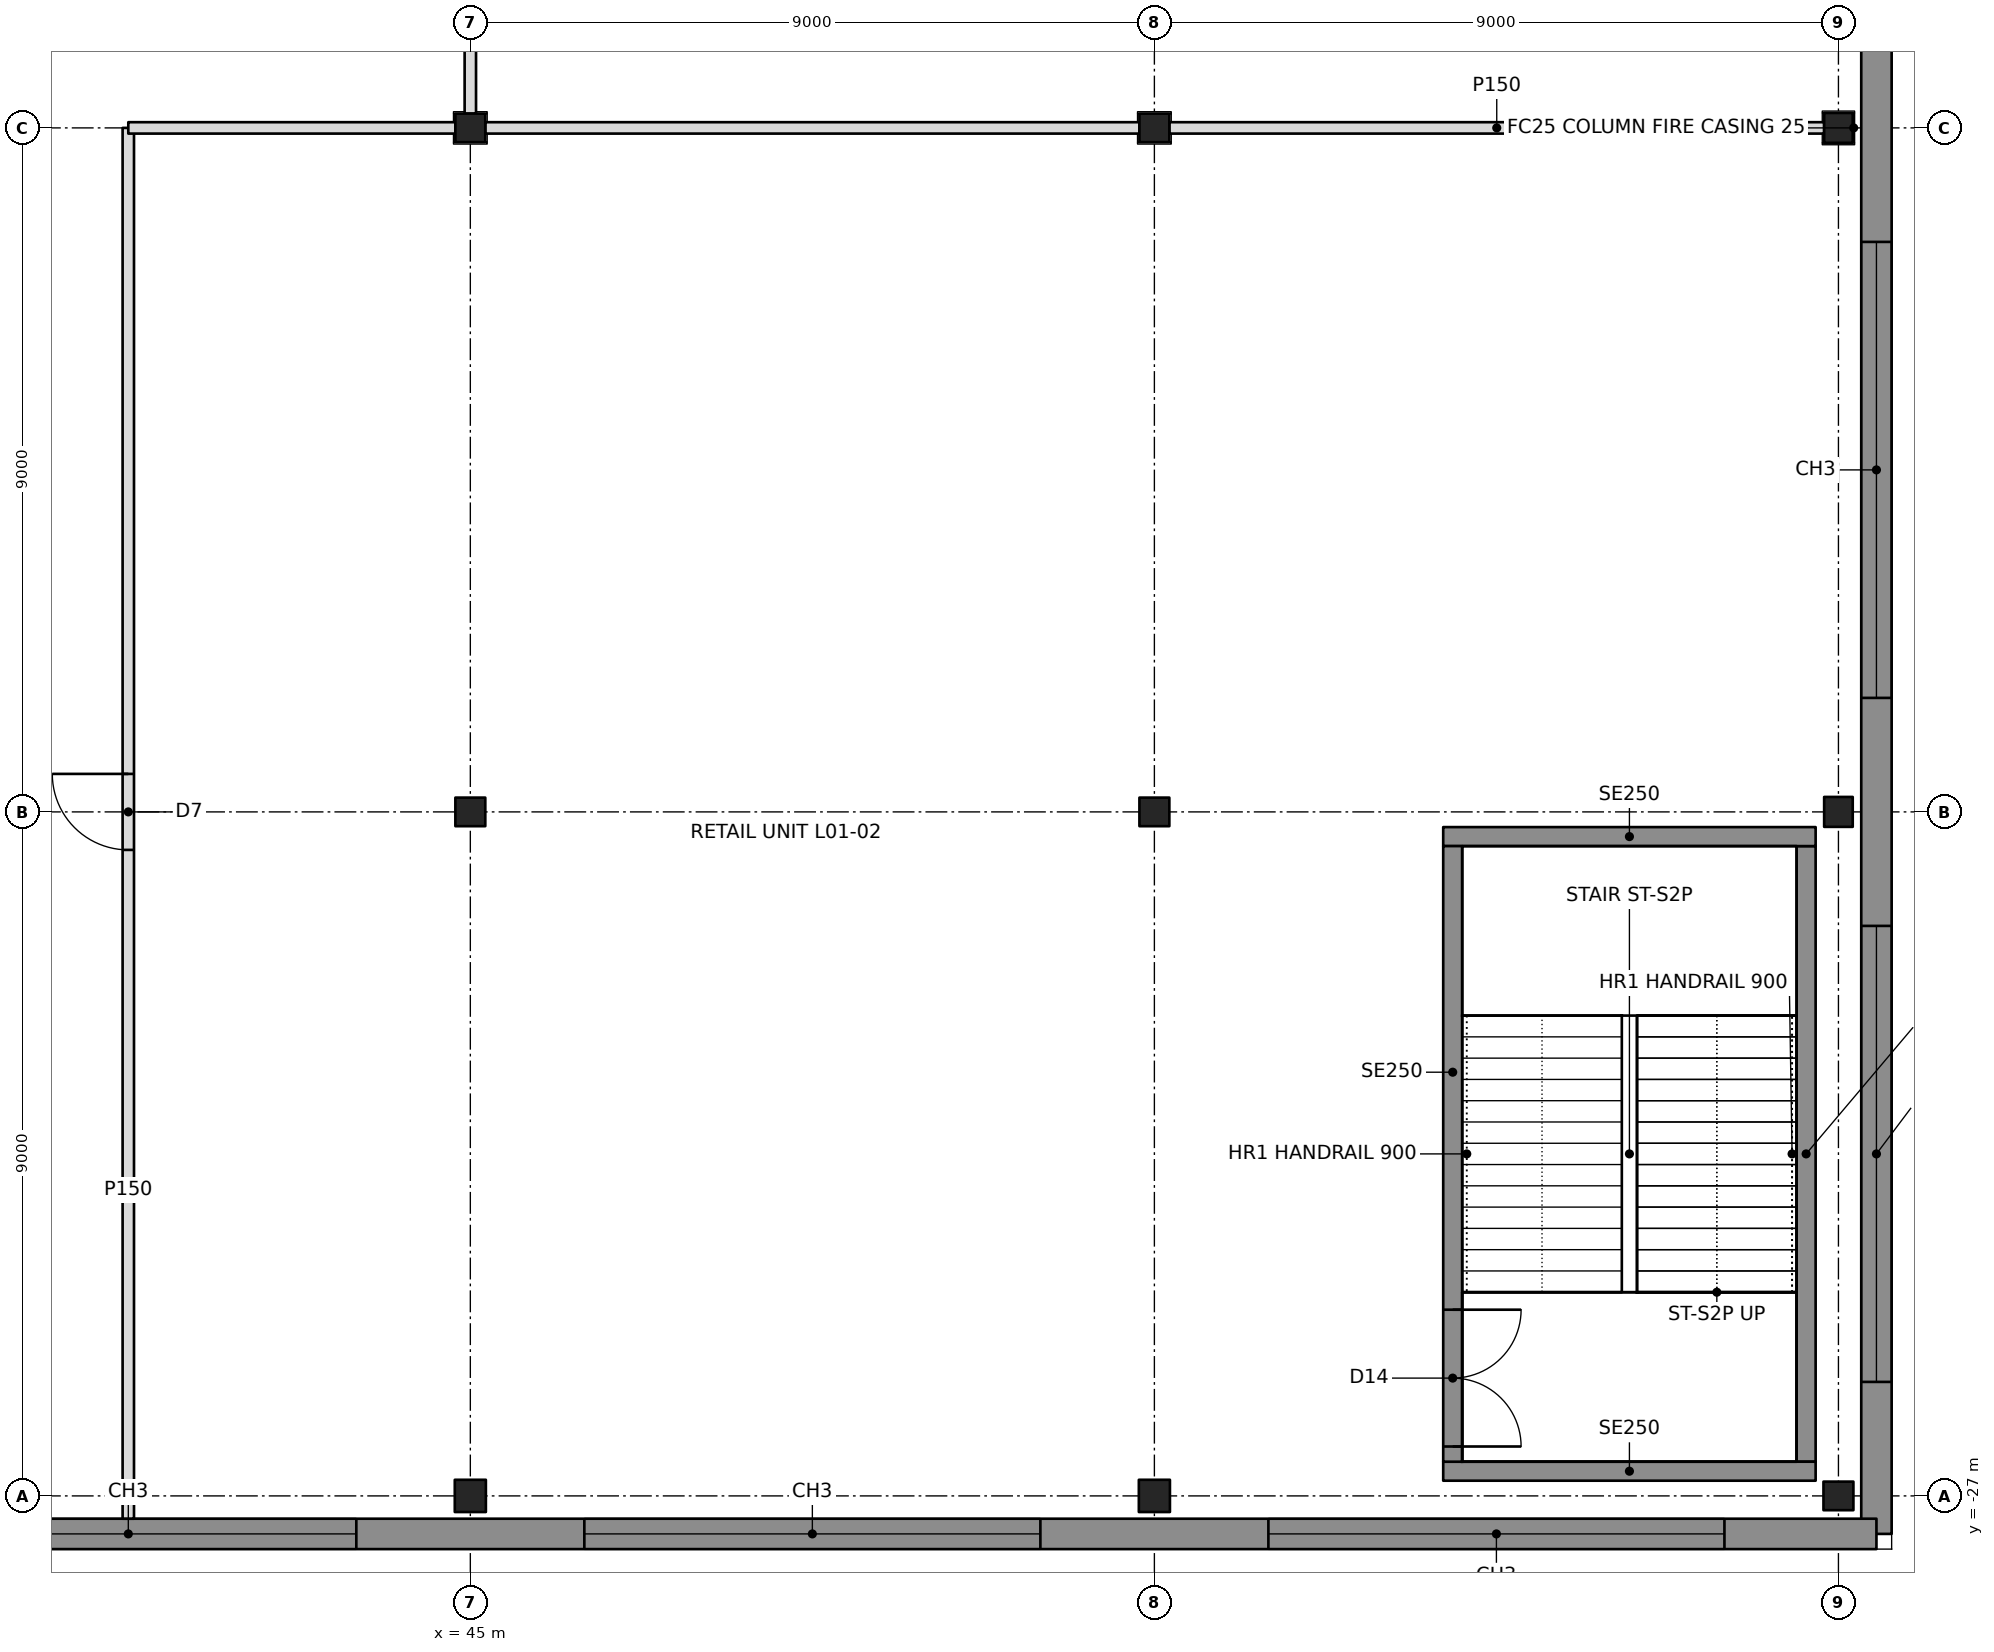
"""IFC4 building model, lengths in metres.
Left out: names, types, materials, properties, quantities, classifications, styles, units other than length and angle.
Written with IfcOpenShell. Run it as: python <this file> out.ifc"""

import sys

from ifc_helpers import new_model, si_unit, direction, frame, frame_2d, origin, origin_2d, place, context, subcontext, project, spatial, rectangle, i_section, extrude, element, fill, save


model = new_model("IFC4")
c1 = context("Model", 3, precision=1e-05, world=origin(), true_north=direction((0.0, 1.0)))
c2 = subcontext(c1, "Body", "Model", "MODEL_VIEW")
j1 = project(units=[si_unit("LENGTHUNIT", "METRE"), si_unit("PLANEANGLEUNIT", "RADIAN")], contexts=[c1])
p1 = place(None, origin())
s1 = spatial("IfcSite", under=j1, at=p1, CompositionType="ELEMENT")
p2 = place(p1, origin())
s2 = spatial("IfcBuilding", under=s1, at=p2, CompositionType="ELEMENT")
p3 = place(p2, frame((0.0, 0.0, 6.0)))
s3 = spatial("IfcBuildingStorey", under=s2, at=p3, CompositionType="ELEMENT", Elevation=6.0)
p4 = place(p3, frame((45.0, -27.0, 0.0), z_axis=(0.0, 0.0, 1.0), x_axis=(1.0, 0.0, 0.0)))
e1 = element("IfcColumn", 1, at=p4, inside=s3, PredefinedType="COLUMN", context=c2, shape_type="SweptSolid", body=[
    extrude(i_section(OverallWidth=0.409, OverallDepth=0.424, WebThickness=0.033, FlangeThickness=0.052, at=origin_2d()), origin(), (0.0, 0.0, 1.0), 5.0),
])
for number, where, z_axis, x_axis in (
    (2, (45.0, -18.0, 0.0), (0.0, 0.0, 1.0), (1.0, 0.0, 0.0)),
    (3, (45.0, -9.0, 0.0), (0.0, 0.0, 1.0), (1.0, 0.0, 0.0)),
):
    element("IfcColumn", number, at=place(p3, frame(where, z_axis=z_axis, x_axis=x_axis)), inside=s3, PredefinedType="COLUMN", context=c2, shape_type="SweptSolid", body=[
        extrude(i_section(OverallWidth=0.394, OverallDepth=0.376, WebThickness=0.017, FlangeThickness=0.028, at=origin_2d()), origin(), (0.0, 0.0, 1.0), 5.0),
    ])
p5 = place(p3, frame((54.0, -27.0, 0.0), z_axis=(0.0, 0.0, 1.0), x_axis=(1.0, 0.0, 0.0)))
e4 = element("IfcColumn", 4, at=p5, inside=s3, PredefinedType="COLUMN", context=c2, shape_type="SweptSolid", body=[
    extrude(i_section(OverallWidth=0.409, OverallDepth=0.424, WebThickness=0.033, FlangeThickness=0.052, at=origin_2d()), origin(), (0.0, 0.0, 1.0), 5.0),
])
for number, where, z_axis, x_axis in (
    (5, (54.0, -18.0, 0.0), (0.0, 0.0, 1.0), (1.0, 0.0, 0.0)),
    (6, (54.0, -9.0, 0.0), (0.0, 0.0, 1.0), (1.0, 0.0, 0.0)),
    (7, (63.0, -27.0, 0.0), (0.0, 0.0, 1.0), (1.0, 0.0, 0.0)),
    (8, (63.0, -18.0, 0.0), (0.0, 0.0, 1.0), (0.0, 1.0, 0.0)),
    (9, (63.0, -9.0, 0.0), (0.0, 0.0, 1.0), (0.0, 1.0, 0.0)),
):
    element("IfcColumn", number, at=place(p3, frame(where, z_axis=z_axis, x_axis=x_axis)), inside=s3, PredefinedType="COLUMN", context=c2, shape_type="SweptSolid", body=[
        extrude(i_section(OverallWidth=0.394, OverallDepth=0.376, WebThickness=0.017, FlangeThickness=0.028, at=origin_2d()), origin(), (0.0, 0.0, 1.0), 5.0),
    ])
p6 = place(p3, frame((-9.5, -27.5, 0.0), z_axis=(0.0, 0.0, 1.0), x_axis=(1.0, 0.0, 0.0)))
e10 = element("IfcWall", 10, at=p6, inside=s3, PredefinedType="SOLIDWALL", context=c2, shape_type="SweptSolid", body=[
    extrude(rectangle(XDim=73.0, YDim=0.4, at=frame_2d((36.5, 0.0))), origin(), (0.0, 0.0, 1.0), 4.75),
])
p7 = place(p6, frame((2.0, 0.0, 0.9)))
e11 = element("IfcOpeningElement", 11, at=p7, cuts=e10, PredefinedType="OPENING", context=c2, shape_type="SweptSolid", body=[
    extrude(rectangle(XDim=6.0, YDim=2.6, at=frame_2d((3.0, 1.3))), frame((0.0, 0.21, 0.0), z_axis=(0.0, -1.0, 0.0), x_axis=(1.0, 0.0, 0.0)), (0.0, 0.0, 1.0), 0.42),
])
p8 = place(p6, frame((11.0, 0.0, 0.9)))
e12 = element("IfcOpeningElement", 12, at=p8, cuts=e10, PredefinedType="OPENING", context=c2, shape_type="SweptSolid", body=[
    extrude(rectangle(XDim=6.0, YDim=2.6, at=frame_2d((3.0, 1.3))), frame((0.0, 0.21, 0.0), z_axis=(0.0, -1.0, 0.0), x_axis=(1.0, 0.0, 0.0)), (0.0, 0.0, 1.0), 0.42),
])
p9 = place(p6, frame((20.0, 0.0, 0.9)))
e13 = element("IfcOpeningElement", 13, at=p9, cuts=e10, PredefinedType="OPENING", context=c2, shape_type="SweptSolid", body=[
    extrude(rectangle(XDim=6.0, YDim=2.6, at=frame_2d((3.0, 1.3))), frame((0.0, 0.21, 0.0), z_axis=(0.0, -1.0, 0.0), x_axis=(1.0, 0.0, 0.0)), (0.0, 0.0, 1.0), 0.42),
])
p10 = place(p6, frame((29.0, 0.0, 0.9)))
e14 = element("IfcOpeningElement", 14, at=p10, cuts=e10, PredefinedType="OPENING", context=c2, shape_type="SweptSolid", body=[
    extrude(rectangle(XDim=6.0, YDim=2.6, at=frame_2d((3.0, 1.3))), frame((0.0, 0.21, 0.0), z_axis=(0.0, -1.0, 0.0), x_axis=(1.0, 0.0, 0.0)), (0.0, 0.0, 1.0), 0.42),
])
p11 = place(p6, frame((38.0, 0.0, 0.9)))
e15 = element("IfcOpeningElement", 15, at=p11, cuts=e10, PredefinedType="OPENING", context=c2, shape_type="SweptSolid", body=[
    extrude(rectangle(XDim=6.0, YDim=2.6, at=frame_2d((3.0, 1.3))), frame((0.0, 0.21, 0.0), z_axis=(0.0, -1.0, 0.0), x_axis=(1.0, 0.0, 0.0)), (0.0, 0.0, 1.0), 0.42),
])
p12 = place(p6, frame((47.0, 0.0, 0.9)))
e16 = element("IfcOpeningElement", 16, at=p12, cuts=e10, PredefinedType="OPENING", context=c2, shape_type="SweptSolid", body=[
    extrude(rectangle(XDim=6.0, YDim=2.6, at=frame_2d((3.0, 1.3))), frame((0.0, 0.21, 0.0), z_axis=(0.0, -1.0, 0.0), x_axis=(1.0, 0.0, 0.0)), (0.0, 0.0, 1.0), 0.42),
])
p13 = place(p6, frame((56.0, 0.0, 0.9)))
e17 = element("IfcOpeningElement", 17, at=p13, cuts=e10, PredefinedType="OPENING", context=c2, shape_type="SweptSolid", body=[
    extrude(rectangle(XDim=6.0, YDim=2.6, at=frame_2d((3.0, 1.3))), frame((0.0, 0.21, 0.0), z_axis=(0.0, -1.0, 0.0), x_axis=(1.0, 0.0, 0.0)), (0.0, 0.0, 1.0), 0.42),
])
p14 = place(p6, frame((65.0, 0.0, 0.9)))
e18 = element("IfcOpeningElement", 18, at=p14, cuts=e10, PredefinedType="OPENING", context=c2, shape_type="SweptSolid", body=[
    extrude(rectangle(XDim=6.0, YDim=2.6, at=frame_2d((3.0, 1.3))), frame((0.0, 0.21, 0.0), z_axis=(0.0, -1.0, 0.0), x_axis=(1.0, 0.0, 0.0)), (0.0, 0.0, 1.0), 0.42),
])
p15 = place(p3, frame((63.5, -27.5, 0.0), z_axis=(0.0, 0.0, 1.0), x_axis=(0.0, 1.0, 0.0)))
e19 = element("IfcWall", 19, at=p15, inside=s3, PredefinedType="SOLIDWALL", context=c2, shape_type="SweptSolid", body=[
    extrude(rectangle(XDim=73.0, YDim=0.4, at=frame_2d((36.5, 0.0))), origin(), (0.0, 0.0, 1.0), 4.75),
])
p16 = place(p15, frame((2.0, 0.0, 0.9)))
e20 = element("IfcOpeningElement", 20, at=p16, cuts=e19, PredefinedType="OPENING", context=c2, shape_type="SweptSolid", body=[
    extrude(rectangle(XDim=6.0, YDim=2.6, at=frame_2d((3.0, 1.3))), frame((0.0, 0.21, 0.0), z_axis=(0.0, -1.0, 0.0), x_axis=(1.0, 0.0, 0.0)), (0.0, 0.0, 1.0), 0.42),
])
p17 = place(p15, frame((11.0, 0.0, 0.9)))
e21 = element("IfcOpeningElement", 21, at=p17, cuts=e19, PredefinedType="OPENING", context=c2, shape_type="SweptSolid", body=[
    extrude(rectangle(XDim=6.0, YDim=2.6, at=frame_2d((3.0, 1.3))), frame((0.0, 0.21, 0.0), z_axis=(0.0, -1.0, 0.0), x_axis=(1.0, 0.0, 0.0)), (0.0, 0.0, 1.0), 0.42),
])
p18 = place(p15, frame((20.0, 0.0, 0.9)))
e22 = element("IfcOpeningElement", 22, at=p18, cuts=e19, PredefinedType="OPENING", context=c2, shape_type="SweptSolid", body=[
    extrude(rectangle(XDim=6.0, YDim=2.6, at=frame_2d((3.0, 1.3))), frame((0.0, 0.21, 0.0), z_axis=(0.0, -1.0, 0.0), x_axis=(1.0, 0.0, 0.0)), (0.0, 0.0, 1.0), 0.42),
])
p19 = place(p15, frame((29.0, 0.0, 0.9)))
e23 = element("IfcOpeningElement", 23, at=p19, cuts=e19, PredefinedType="OPENING", context=c2, shape_type="SweptSolid", body=[
    extrude(rectangle(XDim=6.0, YDim=2.6, at=frame_2d((3.0, 1.3))), frame((0.0, 0.21, 0.0), z_axis=(0.0, -1.0, 0.0), x_axis=(1.0, 0.0, 0.0)), (0.0, 0.0, 1.0), 0.42),
])
p20 = place(p15, frame((38.0, 0.0, 0.9)))
e24 = element("IfcOpeningElement", 24, at=p20, cuts=e19, PredefinedType="OPENING", context=c2, shape_type="SweptSolid", body=[
    extrude(rectangle(XDim=6.0, YDim=2.6, at=frame_2d((3.0, 1.3))), frame((0.0, 0.21, 0.0), z_axis=(0.0, -1.0, 0.0), x_axis=(1.0, 0.0, 0.0)), (0.0, 0.0, 1.0), 0.42),
])
p21 = place(p15, frame((47.0, 0.0, 0.9)))
e25 = element("IfcOpeningElement", 25, at=p21, cuts=e19, PredefinedType="OPENING", context=c2, shape_type="SweptSolid", body=[
    extrude(rectangle(XDim=6.0, YDim=2.6, at=frame_2d((3.0, 1.3))), frame((0.0, 0.21, 0.0), z_axis=(0.0, -1.0, 0.0), x_axis=(1.0, 0.0, 0.0)), (0.0, 0.0, 1.0), 0.42),
])
p22 = place(p15, frame((56.0, 0.0, 0.9)))
e26 = element("IfcOpeningElement", 26, at=p22, cuts=e19, PredefinedType="OPENING", context=c2, shape_type="SweptSolid", body=[
    extrude(rectangle(XDim=6.0, YDim=2.6, at=frame_2d((3.0, 1.3))), frame((0.0, 0.21, 0.0), z_axis=(0.0, -1.0, 0.0), x_axis=(1.0, 0.0, 0.0)), (0.0, 0.0, 1.0), 0.42),
])
p23 = place(p15, frame((65.0, 0.0, 0.9)))
e27 = element("IfcOpeningElement", 27, at=p23, cuts=e19, PredefinedType="OPENING", context=c2, shape_type="SweptSolid", body=[
    extrude(rectangle(XDim=6.0, YDim=2.6, at=frame_2d((3.0, 1.3))), frame((0.0, 0.21, 0.0), z_axis=(0.0, -1.0, 0.0), x_axis=(1.0, 0.0, 0.0)), (0.0, 0.0, 1.0), 0.42),
])
p24 = place(p3, frame((40.5, -27.3, 0.0), z_axis=(0.0, 0.0, 1.0), x_axis=(0.0, 1.0, 0.0)))
e28 = element("IfcWall", 28, at=p24, inside=s3, PredefinedType="PARTITIONING", context=c2, shape_type="SweptSolid", body=[
    extrude(rectangle(XDim=18.3, YDim=0.15, at=frame_2d((9.15, 0.0))), origin(), (0.0, 0.0, 1.0), 3.891),
])
p25 = place(p24, frame((8.8, 0.0, 0.0)))
e29 = element("IfcOpeningElement", 29, at=p25, cuts=e28, PredefinedType="OPENING", context=c2, shape_type="SweptSolid", body=[
    extrude(rectangle(XDim=1.0, YDim=2.1, at=frame_2d((0.5, 1.05))), frame((0.0, 0.085, 0.0), z_axis=(0.0, -1.0, 0.0), x_axis=(1.0, 0.0, 0.0)), (0.0, 0.0, 1.0), 0.17),
])
p26 = place(p3, frame((40.5, -9.0, 0.0), z_axis=(0.0, 0.0, 1.0), x_axis=(1.0, 0.0, 0.0)))
e30 = element("IfcWall", 30, at=p26, inside=s3, PredefinedType="PARTITIONING", context=c2, shape_type="SweptSolid", body=[
    extrude(rectangle(XDim=4.303, YDim=0.15, at=frame_2d((2.152, 0.0))), origin(), (0.0, 0.0, 1.0), 3.892),
])
p27 = place(p3, frame((45.197, -9.0, 0.0), z_axis=(0.0, 0.0, 1.0), x_axis=(1.0, 0.0, 0.0)))
e31 = element("IfcWall", 31, at=p27, inside=s3, PredefinedType="PARTITIONING", context=c2, shape_type="SweptSolid", body=[
    extrude(rectangle(XDim=8.606, YDim=0.15, at=frame_2d((4.303, 0.0))), origin(), (0.0, 0.0, 1.0), 3.892),
])
p28 = place(p3, frame((54.197, -9.0, 0.0), z_axis=(0.0, 0.0, 1.0), x_axis=(1.0, 0.0, 0.0)))
e32 = element("IfcWall", 32, at=p28, inside=s3, PredefinedType="PARTITIONING", context=c2, shape_type="SweptSolid", body=[
    extrude(rectangle(XDim=8.615, YDim=0.15, at=frame_2d((4.308, 0.0))), origin(), (0.0, 0.0, 1.0), 3.892),
])
p29 = place(p3, frame((45.0, -8.812, 0.0), z_axis=(0.0, 0.0, 1.0), x_axis=(0.0, 1.0, 0.0)))
e33 = element("IfcWall", 33, at=p29, inside=s3, PredefinedType="PARTITIONING", context=c2, shape_type="SweptSolid", body=[
    extrude(rectangle(XDim=8.412, YDim=0.15, at=frame_2d((4.206, 0.0))), origin(), (0.0, 0.0, 1.0), 3.892),
])
for number, where, z_axis, x_axis in (
    (34, (57.8, -26.675, 0.0), (0.0, 0.0, 1.0), (1.0, 0.0, 0.0)),
    (35, (57.8, -18.325, 0.0), (0.0, 0.0, 1.0), (1.0, 0.0, 0.0)),
):
    element("IfcWall", number, at=place(p3, frame(where, z_axis=z_axis, x_axis=x_axis)), inside=s3, PredefinedType="SOLIDWALL", context=c2, shape_type="SweptSolid", body=[
        extrude(rectangle(XDim=4.9, YDim=0.25, at=frame_2d((2.45, 0.0))), origin(), (0.0, 0.0, 1.0), 4.75),
    ])
p30 = place(p3, frame((57.925, -26.55, 0.0), z_axis=(0.0, 0.0, 1.0), x_axis=(0.0, 1.0, 0.0)))
e36 = element("IfcWall", 36, at=p30, inside=s3, PredefinedType="SOLIDWALL", context=c2, shape_type="SweptSolid", body=[
    extrude(rectangle(XDim=8.1, YDim=0.25, at=frame_2d((4.05, 0.0))), origin(), (0.0, 0.0, 1.0), 4.75),
])
p31 = place(p30, frame((0.2, 0.0, 0.0)))
e37 = element("IfcOpeningElement", 37, at=p31, cuts=e36, PredefinedType="OPENING", context=c2, shape_type="SweptSolid", body=[
    extrude(rectangle(XDim=1.8, YDim=2.1, at=frame_2d((0.9, 1.05))), frame((0.0, 0.135, 0.0), z_axis=(0.0, -1.0, 0.0), x_axis=(1.0, 0.0, 0.0)), (0.0, 0.0, 1.0), 0.27),
])
p32 = place(p3, frame((62.575, -26.55, 0.0), z_axis=(0.0, 0.0, 1.0), x_axis=(0.0, 1.0, 0.0)))
e38 = element("IfcWall", 38, at=p32, inside=s3, PredefinedType="SOLIDWALL", context=c2, shape_type="SweptSolid", body=[
    extrude(rectangle(XDim=8.1, YDim=0.25, at=frame_2d((4.05, 0.0))), origin(), (0.0, 0.0, 1.0), 4.75),
])
p33 = place(p12, origin())
e39 = element("IfcWindow", 39, at=p33, inside=s3, PartitioningType="TRIPLE_PANEL_VERTICAL", PredefinedType="WINDOW", context=c2, shape_type="SweptSolid", body=[
    extrude(rectangle(XDim=6.0, YDim=2.6, at=frame_2d((3.0, 1.3))), frame((0.0, 0.03, 0.0), z_axis=(0.0, -1.0, 0.0), x_axis=(1.0, 0.0, 0.0)), (0.0, 0.0, 1.0), 0.06),
])
fill(e16, e39)
p34 = place(p13, origin())
e40 = element("IfcWindow", 40, at=p34, inside=s3, PartitioningType="TRIPLE_PANEL_VERTICAL", PredefinedType="WINDOW", context=c2, shape_type="SweptSolid", body=[
    extrude(rectangle(XDim=6.0, YDim=2.6, at=frame_2d((3.0, 1.3))), frame((0.0, 0.03, 0.0), z_axis=(0.0, -1.0, 0.0), x_axis=(1.0, 0.0, 0.0)), (0.0, 0.0, 1.0), 0.06),
])
fill(e17, e40)
p35 = place(p14, origin())
e41 = element("IfcWindow", 41, at=p35, inside=s3, PartitioningType="TRIPLE_PANEL_VERTICAL", PredefinedType="WINDOW", context=c2, shape_type="SweptSolid", body=[
    extrude(rectangle(XDim=6.0, YDim=2.6, at=frame_2d((3.0, 1.3))), frame((0.0, 0.03, 0.0), z_axis=(0.0, -1.0, 0.0), x_axis=(1.0, 0.0, 0.0)), (0.0, 0.0, 1.0), 0.06),
])
fill(e18, e41)
p36 = place(p16, origin())
e42 = element("IfcWindow", 42, at=p36, inside=s3, PartitioningType="TRIPLE_PANEL_VERTICAL", PredefinedType="WINDOW", context=c2, shape_type="SweptSolid", body=[
    extrude(rectangle(XDim=6.0, YDim=2.6, at=frame_2d((3.0, 1.3))), frame((0.0, 0.03, 0.0), z_axis=(0.0, -1.0, 0.0), x_axis=(1.0, 0.0, 0.0)), (0.0, 0.0, 1.0), 0.06),
])
fill(e20, e42)
p37 = place(p17, origin())
e43 = element("IfcWindow", 43, at=p37, inside=s3, PartitioningType="TRIPLE_PANEL_VERTICAL", PredefinedType="WINDOW", context=c2, shape_type="SweptSolid", body=[
    extrude(rectangle(XDim=6.0, YDim=2.6, at=frame_2d((3.0, 1.3))), frame((0.0, 0.03, 0.0), z_axis=(0.0, -1.0, 0.0), x_axis=(1.0, 0.0, 0.0)), (0.0, 0.0, 1.0), 0.06),
])
fill(e21, e43)
p38 = place(p25, origin())
e44 = element("IfcDoor", 44, at=p38, inside=s3, OperationType="SINGLE_SWING_RIGHT", PredefinedType="DOOR", context=c2, shape_type="SweptSolid", body=[
    extrude(rectangle(XDim=1.0, YDim=2.1, at=frame_2d((0.5, 1.05))), frame((0.0, 0.025, 0.0), z_axis=(0.0, -1.0, 0.0), x_axis=(1.0, 0.0, 0.0)), (0.0, 0.0, 1.0), 0.05),
])
fill(e29, e44)
p39 = place(p31, frame((1.8, 0.0, 0.0), z_axis=(0.0, 0.0, 1.0), x_axis=(-1.0, 0.0, 0.0)))
e45 = element("IfcDoor", 45, at=p39, inside=s3, OperationType="DOUBLE_DOOR_SINGLE_SWING", PredefinedType="DOOR", context=c2, shape_type="SweptSolid", body=[
    extrude(rectangle(XDim=1.8, YDim=2.1, at=frame_2d((0.9, 1.05))), frame((0.0, 0.025, 0.0), z_axis=(0.0, -1.0, 0.0), x_axis=(1.0, 0.0, 0.0)), (0.0, 0.0, 1.0), 0.05),
])
fill(e37, e45)
save(model, sys.argv[1])
